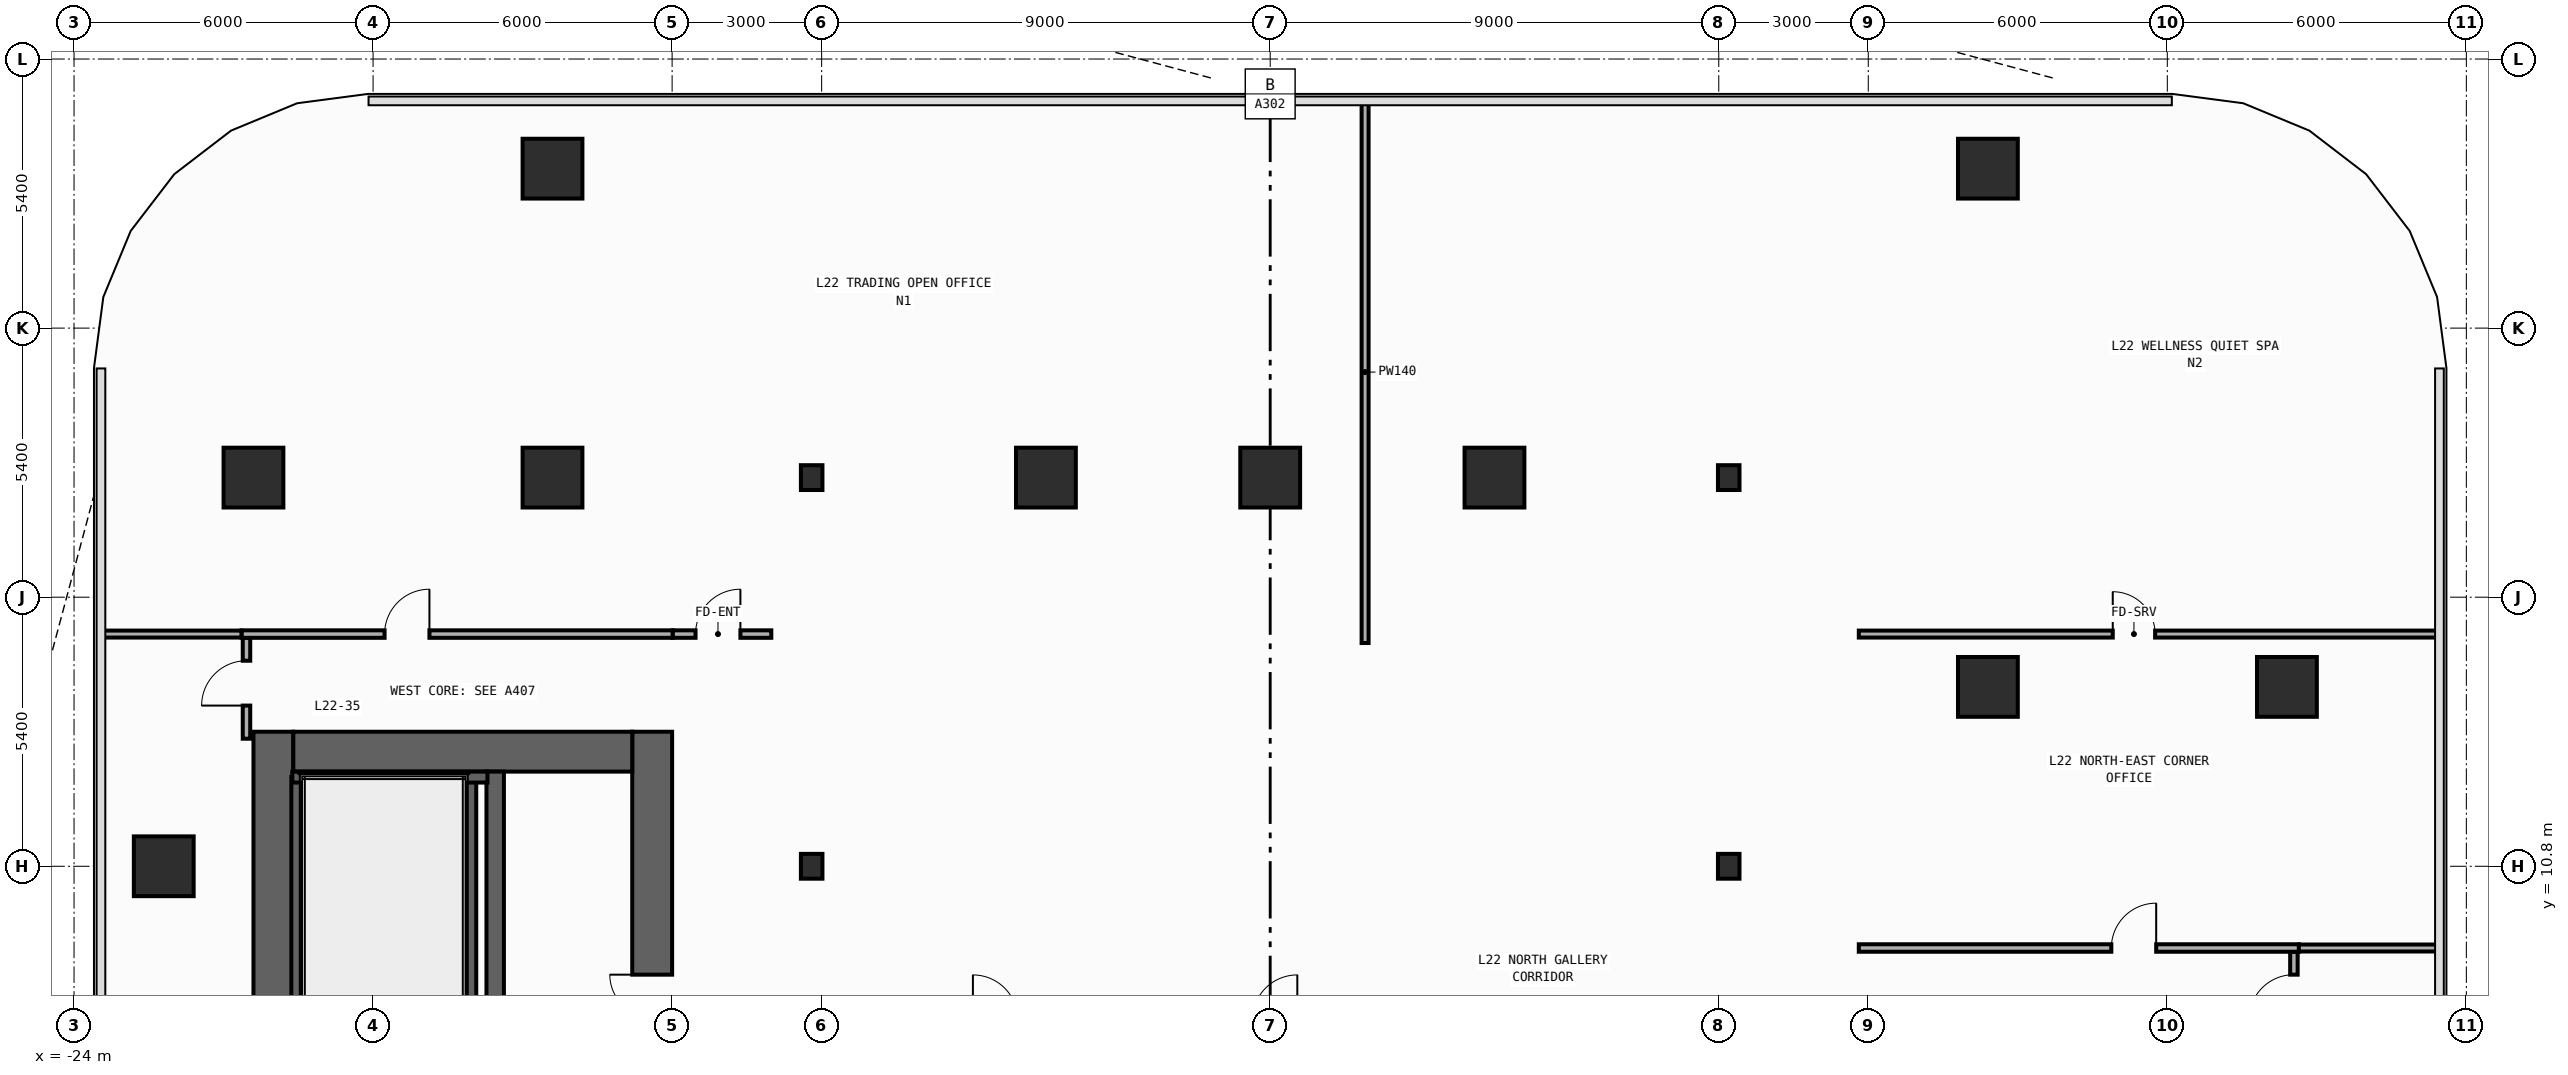
"""IFC4 building model, lengths in metres.
Left out: names, types, materials, properties, quantities, classifications, styles, units other than length and angle.
Written with IfcOpenShell. Run it as: python <this file> out.ifc"""

import sys

from ifc_helpers import new_model, si_unit, direction, frame, frame_2d, origin, origin_2d, place, context, subcontext, project, spatial, rectangle, i_section, extrude, element, fill, save


model = new_model("IFC4")
c1 = context("Model", 3, precision=1e-05, world=origin(), true_north=direction((0.0, 1.0)))
c2 = subcontext(c1, "Body", "Model", "MODEL_VIEW")
j1 = project(units=[si_unit("LENGTHUNIT", "METRE"), si_unit("PLANEANGLEUNIT", "RADIAN")], contexts=[c1])
p1 = place(None, origin())
s1 = spatial("IfcSite", under=j1, at=p1, CompositionType="ELEMENT")
p2 = place(p1, origin())
s2 = spatial("IfcBuilding", under=s1, at=p2, CompositionType="ELEMENT")
p3 = place(p2, frame((0.0, 0.0, 97.4)))
s3 = spatial("IfcBuildingStorey", under=s2, at=p3, CompositionType="ELEMENT", Elevation=97.4)
p4 = place(p3, frame((-20.0, -13.5, 0.0), z_axis=(0.0, 0.0, 1.0), x_axis=(0.0, 1.0, 0.0)))
e1 = element("IfcWall", 1, at=p4, inside=s3, PredefinedType="SHEAR", context=c2, shape_type="SweptSolid", body=[
    extrude(rectangle(XDim=27.0, YDim=0.8, at=frame_2d((13.5, 0.0))), origin(), (0.0, 0.0, 1.0), 3.94),
])
p5 = place(p3, frame((-12.4, -13.5, 0.0), z_axis=(0.0, 0.0, 1.0), x_axis=(0.0, 1.0, 0.0)))
e2 = element("IfcWall", 2, at=p5, inside=s3, PredefinedType="SHEAR", context=c2, shape_type="SweptSolid", body=[
    extrude(rectangle(XDim=27.0, YDim=0.8, at=frame_2d((13.5, 0.0))), origin(), (0.0, 0.0, 1.0), 3.94),
])
p6 = place(p5, frame((10.35, 0.0, 0.0)))
e3 = element("IfcOpeningElement", 3, at=p6, cuts=e2, PredefinedType="OPENING", context=c2, shape_type="SweptSolid", body=[
    extrude(rectangle(XDim=1.1, YDim=2.2, at=frame_2d((0.55, 1.1))), frame((0.0, 0.41, 0.0), z_axis=(0.0, -1.0, 0.0), x_axis=(1.0, 0.0, 0.0)), (0.0, 0.0, 1.0), 0.82),
])
p7 = place(p5, frame((7.15, 0.0, 0.0)))
e4 = element("IfcOpeningElement", 4, at=p7, cuts=e2, PredefinedType="OPENING", context=c2, shape_type="SweptSolid", body=[
    extrude(rectangle(XDim=1.1, YDim=2.2, at=frame_2d((0.55, 1.1))), frame((0.0, 0.41, 0.0), z_axis=(0.0, -1.0, 0.0), x_axis=(1.0, 0.0, 0.0)), (0.0, 0.0, 1.0), 0.82),
])
p8 = place(p5, frame((3.95, 0.0, 0.0)))
e5 = element("IfcOpeningElement", 5, at=p8, cuts=e2, PredefinedType="OPENING", context=c2, shape_type="SweptSolid", body=[
    extrude(rectangle(XDim=1.1, YDim=2.2, at=frame_2d((0.55, 1.1))), frame((0.0, 0.41, 0.0), z_axis=(0.0, -1.0, 0.0), x_axis=(1.0, 0.0, 0.0)), (0.0, 0.0, 1.0), 0.82),
])
p9 = place(p5, frame((15.175, 0.0, 0.0)))
e6 = element("IfcOpeningElement", 6, at=p9, cuts=e2, PredefinedType="OPENING", context=c2, shape_type="SweptSolid", body=[
    extrude(rectangle(XDim=0.85, YDim=2.1, at=frame_2d((0.425, 1.05))), frame((0.0, 0.41, 0.0), z_axis=(0.0, -1.0, 0.0), x_axis=(1.0, 0.0, 0.0)), (0.0, 0.0, 1.0), 0.82),
])
p10 = place(p5, frame((21.275, 0.0, 0.0)))
e7 = element("IfcOpeningElement", 7, at=p10, cuts=e2, PredefinedType="OPENING", context=c2, shape_type="SweptSolid", body=[
    extrude(rectangle(XDim=0.85, YDim=2.1, at=frame_2d((0.425, 1.05))), frame((0.0, 0.41, 0.0), z_axis=(0.0, -1.0, 0.0), x_axis=(1.0, 0.0, 0.0)), (0.0, 0.0, 1.0), 0.82),
])
p11 = place(p5, frame((12.725, 0.0, 0.0)))
e8 = element("IfcOpeningElement", 8, at=p11, cuts=e2, PredefinedType="OPENING", context=c2, shape_type="SweptSolid", body=[
    extrude(rectangle(XDim=1.15, YDim=2.2, at=frame_2d((0.575, 1.1))), frame((0.0, 0.41, 0.0), z_axis=(0.0, -1.0, 0.0), x_axis=(1.0, 0.0, 0.0)), (0.0, 0.0, 1.0), 0.82),
])
p12 = place(p5, frame((1.625, 0.0, 0.0)))
e9 = element("IfcOpeningElement", 9, at=p12, cuts=e2, PredefinedType="OPENING", context=c2, shape_type="SweptSolid", body=[
    extrude(rectangle(XDim=0.85, YDim=2.1, at=frame_2d((0.425, 1.05))), frame((0.0, 0.41, 0.0), z_axis=(0.0, -1.0, 0.0), x_axis=(1.0, 0.0, 0.0)), (0.0, 0.0, 1.0), 0.82),
])
p13 = place(p3, frame((-19.6, 13.1, 0.0), z_axis=(0.0, 0.0, 1.0), x_axis=(1.0, 0.0, 0.0)))
e10 = element("IfcWall", 10, at=p13, inside=s3, PredefinedType="SHEAR", context=c2, shape_type="SweptSolid", body=[
    extrude(rectangle(XDim=6.8, YDim=0.8, at=frame_2d((3.4, 0.0))), origin(), (0.0, 0.0, 1.0), 3.94),
])
p14 = place(p3, frame((-15.55, -12.7, 0.0), z_axis=(0.0, 0.0, 1.0), x_axis=(0.0, 1.0, 0.0)))
e11 = element("IfcWall", 11, at=p14, inside=s3, PredefinedType="SHEAR", context=c2, shape_type="SweptSolid", body=[
    extrude(rectangle(XDim=25.4, YDim=0.35, at=frame_2d((12.7, 0.0))), origin(), (0.0, 0.0, 1.0), 3.94),
])
p15 = place(p14, frame((11.925, 0.0, 0.0)))
e12 = element("IfcOpeningElement", 12, at=p15, cuts=e11, PredefinedType="OPENING", context=c2, shape_type="SweptSolid", body=[
    extrude(rectangle(XDim=1.15, YDim=2.2, at=frame_2d((0.575, 1.1))), frame((0.0, 0.185, 0.0), z_axis=(0.0, -1.0, 0.0), x_axis=(1.0, 0.0, 0.0)), (0.0, 0.0, 1.0), 0.37),
])
p16 = place(p14, frame((0.825, 0.0, 0.0)))
e13 = element("IfcOpeningElement", 13, at=p16, cuts=e11, PredefinedType="OPENING", context=c2, shape_type="SweptSolid", body=[
    extrude(rectangle(XDim=0.85, YDim=2.1, at=frame_2d((0.425, 1.05))), frame((0.0, 0.185, 0.0), z_axis=(0.0, -1.0, 0.0), x_axis=(1.0, 0.0, 0.0)), (0.0, 0.0, 1.0), 0.37),
])
for number, where, z_axis, x_axis in (
    (14, (-16.04, 1.29, 0.0), (0.0, 0.0, 1.0), (0.0, 1.0, 0.0)),
    (15, (-19.53, 1.29, 0.0), (0.0, 0.0, 1.0), (0.0, 1.0, 0.0)),
):
    element("IfcWall", number, at=place(p3, frame(where, z_axis=z_axis, x_axis=x_axis)), inside=s3, PredefinedType="SHEAR", context=c2, shape_type="SweptSolid", body=[
        extrude(rectangle(XDim=11.3, YDim=0.22, at=frame_2d((5.65, 0.0))), origin(), (0.0, 0.0, 1.0), 3.94),
    ])
p17 = place(p3, frame((-19.62, 12.59, 0.0), z_axis=(0.0, 0.0, 1.0), x_axis=(1.0, 0.0, 0.0)))
e16 = element("IfcWall", 16, at=p17, inside=s3, PredefinedType="SHEAR", context=c2, shape_type="SweptSolid", body=[
    extrude(rectangle(XDim=3.915, YDim=0.22, at=frame_2d((1.958, 0.0))), origin(), (0.0, 0.0, 1.0), 3.94),
])
for number, where, z_axis, x_axis in (
    (17, (-9.2, 10.8, 0.0), (0.0, 0.0, 1.0), (1.0, 0.0, 0.0)),
    (18, (-9.2, 18.6, 0.0), (0.0, 0.0, 1.0), (1.0, 0.0, 0.0)),
    (19, (9.2, 10.8, 0.0), (0.0, 0.0, 1.0), (1.0, 0.0, 0.0)),
    (20, (9.2, 18.6, 0.0), (0.0, 0.0, 1.0), (1.0, 0.0, 0.0)),
):
    element("IfcColumn", number, at=place(p3, frame(where, z_axis=z_axis, x_axis=x_axis)), inside=s3, PredefinedType="COLUMN", context=c2, shape_type="SweptSolid", body=[
        extrude(i_section(OverallWidth=0.432, OverallDepth=0.498, WebThickness=0.045, FlangeThickness=0.07, FilletRadius=0.022, at=origin_2d()), origin(), (0.0, 0.0, 1.0), 4.2),
    ])
for number, where, z_axis, x_axis in (
    (21, (-20.4, 18.6, 0.0), (0.0, 0.0, 1.0), (1.0, 0.0, 0.0)),
    (22, (20.4, 14.4, 0.0), (0.0, 0.0, 1.0), (1.0, 0.0, 0.0)),
    (23, (-14.4, 18.6, 0.0), (0.0, 0.0, 1.0), (1.0, 0.0, 0.0)),
    (24, (14.4, 14.4, 0.0), (0.0, 0.0, 1.0), (1.0, 0.0, 0.0)),
    (25, (-4.5, 18.6, 0.0), (0.0, 0.0, 1.0), (1.0, 0.0, 0.0)),
    (26, (0.0, 18.6, 0.0), (0.0, 0.0, 1.0), (1.0, 0.0, 0.0)),
    (27, (4.5, 18.6, 0.0), (0.0, 0.0, 1.0), (1.0, 0.0, 0.0)),
    (28, (-22.2, 10.8, 0.0), (0.0, 0.0, 1.0), (1.0, 0.0, 0.0)),
    (29, (-14.4, 24.8, 0.0), (0.0, 0.0, 1.0), (1.0, 0.0, 0.0)),
    (30, (14.4, 24.8, 0.0), (0.0, 0.0, 1.0), (1.0, 0.0, 0.0)),
):
    element("IfcColumn", number, at=place(p3, frame(where, z_axis=z_axis, x_axis=x_axis)), inside=s3, PredefinedType="COLUMN", context=c2, shape_type="SweptSolid", body=[
        extrude(rectangle(XDim=1.2, YDim=1.2, at=origin_2d()), origin(), (0.0, 0.0, 1.0), 4.2),
    ])
p18 = place(p3, frame((-11.99, 15.46, 0.0), z_axis=(0.0, 0.0, 1.0), x_axis=(1.0, 0.0, 0.0)))
e31 = element("IfcWall", 31, at=p18, inside=s3, PredefinedType="PARTITIONING", context=c2, shape_type="SweptSolid", body=[
    extrude(rectangle(XDim=1.98, YDim=0.15, at=frame_2d((0.99, 0.0))), origin(), (0.0, 0.0, 1.0), 3.94),
])
p19 = place(p18, frame((0.46, 0.0, 0.0)))
e32 = element("IfcOpeningElement", 32, at=p19, cuts=e31, PredefinedType="OPENING", context=c2, shape_type="SweptSolid", body=[
    extrude(rectangle(XDim=0.9, YDim=2.15, at=frame_2d((0.45, 1.075))), frame((0.0, 0.085, 0.0), z_axis=(0.0, -1.0, 0.0), x_axis=(1.0, 0.0, 0.0)), (0.0, 0.0, 1.0), 0.17),
])
p20 = place(p3, frame((-20.54, 13.36, 0.0), z_axis=(0.0, 0.0, 1.0), x_axis=(0.0, 1.0, 0.0)))
e33 = element("IfcWall", 33, at=p20, inside=s3, PredefinedType="PARTITIONING", context=c2, shape_type="SweptSolid", body=[
    extrude(rectangle(XDim=2.025, YDim=0.15, at=frame_2d((1.012, 0.0))), origin(), (0.0, 0.0, 1.0), 3.94),
])
p21 = place(p20, frame((0.665, 0.0, 0.0)))
e34 = element("IfcOpeningElement", 34, at=p21, cuts=e33, PredefinedType="OPENING", context=c2, shape_type="SweptSolid", body=[
    extrude(rectangle(XDim=0.9, YDim=2.15, at=frame_2d((0.45, 1.075))), frame((0.0, 0.085, 0.0), z_axis=(0.0, -1.0, 0.0), x_axis=(1.0, 0.0, 0.0)), (0.0, 0.0, 1.0), 0.17),
])
p22 = place(p3, frame((-20.64, 15.46, 0.0), z_axis=(0.0, 0.0, 1.0), x_axis=(1.0, 0.0, 0.0)))
e35 = element("IfcWall", 35, at=p22, inside=s3, PredefinedType="PARTITIONING", context=c2, shape_type="SweptSolid", body=[
    extrude(rectangle(XDim=8.65, YDim=0.15, at=frame_2d((4.325, 0.0))), origin(), (0.0, 0.0, 1.0), 3.94),
])
p23 = place(p22, frame((2.871, 0.0, 0.0)))
e36 = element("IfcOpeningElement", 36, at=p23, cuts=e35, PredefinedType="OPENING", context=c2, shape_type="SweptSolid", body=[
    extrude(rectangle(XDim=0.9, YDim=2.15, at=frame_2d((0.45, 1.075))), frame((0.0, 0.085, 0.0), z_axis=(0.0, -1.0, 0.0), x_axis=(1.0, 0.0, 0.0)), (0.0, 0.0, 1.0), 0.17),
])
p24 = place(p3, frame((20.54, 7.06, 0.0), z_axis=(0.0, 0.0, 1.0), x_axis=(0.0, 1.0, 0.0)))
e37 = element("IfcWall", 37, at=p24, inside=s3, PredefinedType="PARTITIONING", context=c2, shape_type="SweptSolid", body=[
    extrude(rectangle(XDim=2.025, YDim=0.15, at=frame_2d((1.012, 0.0))), origin(), (0.0, 0.0, 1.0), 3.94),
])
p25 = place(p24, frame((0.665, 0.0, 0.0)))
e38 = element("IfcOpeningElement", 38, at=p25, cuts=e37, PredefinedType="OPENING", context=c2, shape_type="SweptSolid", body=[
    extrude(rectangle(XDim=0.9, YDim=2.15, at=frame_2d((0.45, 1.075))), frame((0.0, 0.085, 0.0), z_axis=(0.0, -1.0, 0.0), x_axis=(1.0, 0.0, 0.0)), (0.0, 0.0, 1.0), 0.17),
])
p26 = place(p3, frame((11.81, 9.16, 0.0), z_axis=(0.0, 0.0, 1.0), x_axis=(1.0, 0.0, 0.0)))
e39 = element("IfcWall", 39, at=p26, inside=s3, PredefinedType="PARTITIONING", context=c2, shape_type="SweptSolid", body=[
    extrude(rectangle(XDim=8.83, YDim=0.15, at=frame_2d((4.415, 0.0))), origin(), (0.0, 0.0, 1.0), 3.94),
])
p27 = place(p26, frame((5.067, 0.0, 0.0)))
e40 = element("IfcOpeningElement", 40, at=p27, cuts=e39, PredefinedType="OPENING", context=c2, shape_type="SweptSolid", body=[
    extrude(rectangle(XDim=0.9, YDim=2.15, at=frame_2d((0.45, 1.075))), frame((0.0, 0.085, 0.0), z_axis=(0.0, -1.0, 0.0), x_axis=(1.0, 0.0, 0.0)), (0.0, 0.0, 1.0), 0.17),
])
for number, where, z_axis, x_axis in (
    (41, (-23.455, 15.46, 0.0), (0.0, 0.0, 1.0), (1.0, 0.0, 0.0)),
    (42, (20.64, 9.16, 0.0), (0.0, 0.0, 1.0), (1.0, 0.0, 0.0)),
):
    element("IfcWall", number, at=place(p3, frame(where, z_axis=z_axis, x_axis=x_axis)), inside=s3, PredefinedType="PARTITIONING", context=c2, shape_type="SweptSolid", body=[
        extrude(rectangle(XDim=2.815, YDim=0.14, at=frame_2d((1.408, 0.0))), origin(), (0.0, 0.0, 1.0), 3.94),
    ])
p28 = place(p3, frame((11.81, 15.46, 0.0), z_axis=(0.0, 0.0, 1.0), x_axis=(1.0, 0.0, 0.0)))
e43 = element("IfcWall", 43, at=p28, inside=s3, PredefinedType="PARTITIONING", context=c2, shape_type="SweptSolid", body=[
    extrude(rectangle(XDim=11.645, YDim=0.14, at=frame_2d((5.823, 0.0))), origin(), (0.0, 0.0, 1.0), 3.94),
])
p29 = place(p28, frame((5.095, 0.0, 0.0)))
e44 = element("IfcOpeningElement", 44, at=p29, cuts=e43, PredefinedType="OPENING", context=c2, shape_type="SweptSolid", body=[
    extrude(rectangle(XDim=0.85, YDim=2.1, at=frame_2d((0.425, 1.05))), frame((0.0, 0.08, 0.0), z_axis=(0.0, -1.0, 0.0), x_axis=(1.0, 0.0, 0.0)), (0.0, 0.0, 1.0), 0.16),
])
p30 = place(p3, frame((1.904, 15.28, 0.0), z_axis=(0.0, 0.0, 1.0), x_axis=(0.0, 1.0, 0.0)))
e45 = element("IfcWall", 45, at=p30, inside=s3, PredefinedType="PARTITIONING", context=c2, shape_type="SweptSolid", body=[
    extrude(rectangle(XDim=10.875, YDim=0.14, at=frame_2d((5.438, 0.0))), origin(), (0.0, 0.0, 1.0), 3.94),
])
p31 = place(p10, origin())
e46 = element("IfcDoor", 46, at=p31, inside=s3, OperationType="SINGLE_SWING_RIGHT", PredefinedType="DOOR", context=c2, shape_type="SweptSolid", body=[
    extrude(rectangle(XDim=0.85, YDim=2.1, at=frame_2d((0.425, 1.05))), frame((0.0, 0.025, 0.0), z_axis=(0.0, -1.0, 0.0), x_axis=(1.0, 0.0, 0.0)), (0.0, 0.0, 1.0), 0.05),
])
fill(e7, e46)
p32 = place(p19, origin())
e47 = element("IfcDoor", 47, at=p32, inside=s3, OperationType="SINGLE_SWING_RIGHT", PredefinedType="DOOR", context=c2, shape_type="SweptSolid", body=[
    extrude(rectangle(XDim=0.9, YDim=2.15, at=frame_2d((0.45, 1.075))), frame((0.0, 0.025, 0.0), z_axis=(0.0, -1.0, 0.0), x_axis=(1.0, 0.0, 0.0)), (0.0, 0.0, 1.0), 0.05),
])
fill(e32, e47)
p33 = place(p21, origin())
e48 = element("IfcDoor", 48, at=p33, inside=s3, OperationType="SINGLE_SWING_LEFT", PredefinedType="DOOR", context=c2, shape_type="SweptSolid", body=[
    extrude(rectangle(XDim=0.9, YDim=2.15, at=frame_2d((0.45, 1.075))), frame((0.0, 0.025, 0.0), z_axis=(0.0, -1.0, 0.0), x_axis=(1.0, 0.0, 0.0)), (0.0, 0.0, 1.0), 0.05),
])
fill(e34, e48)
p34 = place(p23, origin())
e49 = element("IfcDoor", 49, at=p34, inside=s3, OperationType="SINGLE_SWING_RIGHT", PredefinedType="DOOR", context=c2, shape_type="SweptSolid", body=[
    extrude(rectangle(XDim=0.9, YDim=2.15, at=frame_2d((0.45, 1.075))), frame((0.0, 0.025, 0.0), z_axis=(0.0, -1.0, 0.0), x_axis=(1.0, 0.0, 0.0)), (0.0, 0.0, 1.0), 0.05),
])
fill(e36, e49)
p35 = place(p25, origin())
e50 = element("IfcDoor", 50, at=p35, inside=s3, OperationType="SINGLE_SWING_LEFT", PredefinedType="DOOR", context=c2, shape_type="SweptSolid", body=[
    extrude(rectangle(XDim=0.9, YDim=2.15, at=frame_2d((0.45, 1.075))), frame((0.0, 0.025, 0.0), z_axis=(0.0, -1.0, 0.0), x_axis=(1.0, 0.0, 0.0)), (0.0, 0.0, 1.0), 0.05),
])
fill(e38, e50)
p36 = place(p27, origin())
e51 = element("IfcDoor", 51, at=p36, inside=s3, OperationType="SINGLE_SWING_RIGHT", PredefinedType="DOOR", context=c2, shape_type="SweptSolid", body=[
    extrude(rectangle(XDim=0.9, YDim=2.15, at=frame_2d((0.45, 1.075))), frame((0.0, 0.025, 0.0), z_axis=(0.0, -1.0, 0.0), x_axis=(1.0, 0.0, 0.0)), (0.0, 0.0, 1.0), 0.05),
])
fill(e40, e51)
p37 = place(p29, origin())
e52 = element("IfcDoor", 52, at=p37, inside=s3, OperationType="SINGLE_SWING_LEFT", PredefinedType="DOOR", context=c2, shape_type="SweptSolid", body=[
    extrude(rectangle(XDim=0.85, YDim=2.1, at=frame_2d((0.425, 1.05))), frame((0.0, 0.025, 0.0), z_axis=(0.0, -1.0, 0.0), x_axis=(1.0, 0.0, 0.0)), (0.0, 0.0, 1.0), 0.05),
])
fill(e44, e52)
save(model, sys.argv[1])
